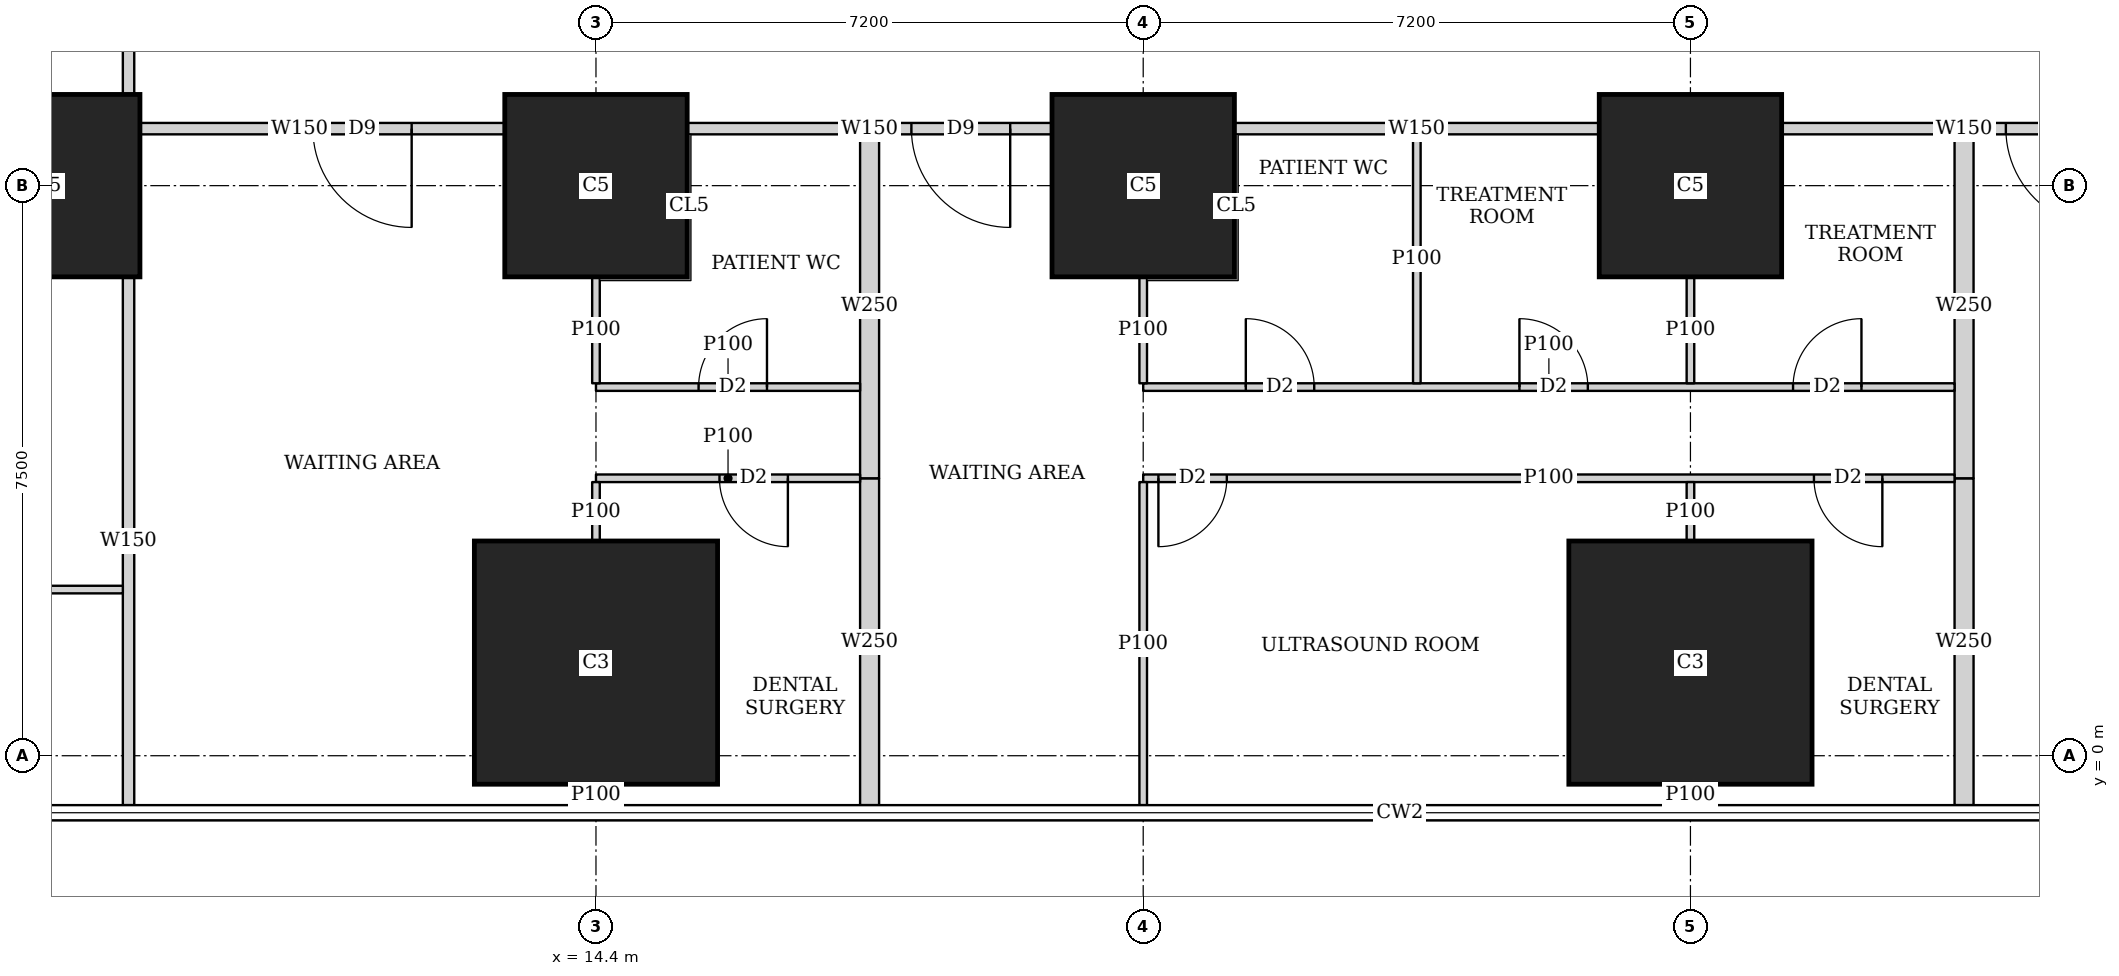
"""IFC4 building model, lengths in metres.
Left out: names, types, materials, properties, quantities, classifications, styles, units other than length and angle.
Written with IfcOpenShell. Run it as: python <this file> out.ifc"""

import sys

from ifc_helpers import new_model, si_unit, direction, frame, frame_2d, origin, origin_2d, place, context, subcontext, project, spatial, rectangle, extrude, element, fill, save


model = new_model("IFC4")
c1 = context("Model", 3, precision=1e-05, world=origin(), true_north=direction((0.0, 1.0)))
c2 = subcontext(c1, "Body", "Model", "MODEL_VIEW")
j1 = project(units=[si_unit("LENGTHUNIT", "METRE"), si_unit("PLANEANGLEUNIT", "RADIAN")], contexts=[c1])
p1 = place(None, origin())
s1 = spatial("IfcSite", under=j1, at=p1, CompositionType="ELEMENT")
p2 = place(p1, origin())
s2 = spatial("IfcBuilding", under=s1, at=p2, CompositionType="ELEMENT")
p3 = place(p2, frame((0.0, 0.0, 10.1)))
s3 = spatial("IfcBuildingStorey", under=s2, at=p3, CompositionType="ELEMENT", Elevation=10.1)
for number, where, z_axis, x_axis in (
    (1, (14.4, 1.225, 0.0), (0.0, 0.0, 1.0), (1.0, 0.0, 0.0)),
    (2, (28.8, 1.225, 0.0), (0.0, 0.0, 1.0), (1.0, 0.0, 0.0)),
):
    element("IfcColumn", number, at=place(p3, frame(where, z_axis=z_axis, x_axis=x_axis)), inside=s3, PredefinedType="COLUMN", context=c2, shape_type="SweptSolid", body=[
        extrude(rectangle(XDim=3.2, YDim=3.2, at=origin_2d()), origin(), (0.0, 0.0, 1.0), 4.5),
    ])
for number, where, z_axis, x_axis in (
    (3, (7.2, 7.5, 0.0), (0.0, 0.0, 1.0), (1.0, 0.0, 0.0)),
    (4, (14.4, 7.5, 0.0), (0.0, 0.0, 1.0), (1.0, 0.0, 0.0)),
    (5, (21.6, 7.5, 0.0), (0.0, 0.0, 1.0), (1.0, 0.0, 0.0)),
    (6, (28.8, 7.5, 0.0), (0.0, 0.0, 1.0), (1.0, 0.0, 0.0)),
):
    element("IfcColumn", number, at=place(p3, frame(where, z_axis=z_axis, x_axis=x_axis)), inside=s3, PredefinedType="COLUMN", context=c2, shape_type="SweptSolid", body=[
        extrude(rectangle(XDim=2.4, YDim=2.4, at=origin_2d()), origin(), (0.0, 0.0, 1.0), 4.5),
    ])
p4 = place(p3, frame((8.25, -0.65, 0.0), z_axis=(0.0, 0.0, 1.0), x_axis=(0.0, 1.0, 0.0)))
e7 = element("IfcWall", 7, at=p4, inside=s3, PredefinedType="SOLIDWALL", context=c2, shape_type="SweptSolid", body=[
    extrude(rectangle(XDim=6.949, YDim=0.15, at=frame_2d((3.475, 0.0))), origin(), (0.0, 0.0, 1.0), 2.4),
])
p5 = place(p3, frame((8.25, 8.701, 0.0), z_axis=(0.0, 0.0, 1.0), x_axis=(0.0, 1.0, 0.0)))
e8 = element("IfcWall", 8, at=p5, inside=s3, PredefinedType="SOLIDWALL", context=c2, shape_type="SweptSolid", body=[
    extrude(rectangle(XDim=5.098, YDim=0.15, at=frame_2d((2.549, 0.0))), origin(), (0.0, 0.0, 1.0), 4.2),
])
p6 = place(p5, frame((0.661, 0.0, 0.0)))
e9 = element("IfcOpeningElement", 9, at=p6, cuts=e8, PredefinedType="OPENING", context=c2, shape_type="SweptSolid", body=[
    extrude(rectangle(XDim=1.3, YDim=2.1, at=frame_2d((0.65, 1.05))), frame((0.0, 0.085, 0.0), z_axis=(0.0, -1.0, 0.0), x_axis=(1.0, 0.0, 0.0)), (0.0, 0.0, 1.0), 0.17),
])
p7 = place(p5, frame((3.136, 0.0, 0.0)))
e10 = element("IfcOpeningElement", 10, at=p7, cuts=e8, PredefinedType="OPENING", context=c2, shape_type="SweptSolid", body=[
    extrude(rectangle(XDim=1.3, YDim=2.1, at=frame_2d((0.65, 1.05))), frame((0.0, 0.085, 0.0), z_axis=(0.0, -1.0, 0.0), x_axis=(1.0, 0.0, 0.0)), (0.0, 0.0, 1.0), 0.17),
])
p8 = place(p3, frame((34.799, 8.25, 0.0), z_axis=(0.0, 0.0, 1.0), x_axis=(-1.0, 0.0, 0.0)))
e11 = element("IfcWall", 11, at=p8, inside=s3, PredefinedType="SOLIDWALL", context=c2, shape_type="SweptSolid", body=[
    extrude(rectangle(XDim=4.798, YDim=0.15, at=frame_2d((2.399, 0.0))), origin(), (0.0, 0.0, 1.0), 2.6),
])
p9 = place(p8, frame((0.549, 0.0, 0.0)))
e12 = element("IfcOpeningElement", 12, at=p9, cuts=e11, PredefinedType="OPENING", context=c2, shape_type="SweptSolid", body=[
    extrude(rectangle(XDim=1.3, YDim=2.1, at=frame_2d((0.65, 1.05))), frame((0.0, 0.085, 0.0), z_axis=(0.0, -1.0, 0.0), x_axis=(1.0, 0.0, 0.0)), (0.0, 0.0, 1.0), 0.17),
])
p10 = place(p3, frame((27.599, 8.25, 0.0), z_axis=(0.0, 0.0, 1.0), x_axis=(-1.0, 0.0, 0.0)))
e13 = element("IfcWall", 13, at=p10, inside=s3, PredefinedType="SOLIDWALL", context=c2, shape_type="SweptSolid", body=[
    extrude(rectangle(XDim=4.798, YDim=0.15, at=frame_2d((2.399, 0.0))), origin(), (0.0, 0.0, 1.0), 2.6),
])
p11 = place(p3, frame((20.399, 8.25, 0.0), z_axis=(0.0, 0.0, 1.0), x_axis=(-1.0, 0.0, 0.0)))
e14 = element("IfcWall", 14, at=p11, inside=s3, PredefinedType="SOLIDWALL", context=c2, shape_type="SweptSolid", body=[
    extrude(rectangle(XDim=4.798, YDim=0.15, at=frame_2d((2.399, 0.0))), origin(), (0.0, 0.0, 1.0), 2.6),
])
p12 = place(p11, frame((0.549, 0.0, 0.0)))
e15 = element("IfcOpeningElement", 15, at=p12, cuts=e14, PredefinedType="OPENING", context=c2, shape_type="SweptSolid", body=[
    extrude(rectangle(XDim=1.3, YDim=2.1, at=frame_2d((0.65, 1.05))), frame((0.0, 0.085, 0.0), z_axis=(0.0, -1.0, 0.0), x_axis=(1.0, 0.0, 0.0)), (0.0, 0.0, 1.0), 0.17),
])
p13 = place(p3, frame((13.199, 8.25, 0.0), z_axis=(0.0, 0.0, 1.0), x_axis=(-1.0, 0.0, 0.0)))
e16 = element("IfcWall", 16, at=p13, inside=s3, PredefinedType="SOLIDWALL", context=c2, shape_type="SweptSolid", body=[
    extrude(rectangle(XDim=4.798, YDim=0.15, at=frame_2d((2.399, 0.0))), origin(), (0.0, 0.0, 1.0), 2.6),
])
p14 = place(p13, frame((1.224, 0.0, 0.0)))
e17 = element("IfcOpeningElement", 17, at=p14, cuts=e16, PredefinedType="OPENING", context=c2, shape_type="SweptSolid", body=[
    extrude(rectangle(XDim=1.3, YDim=2.1, at=frame_2d((0.65, 1.05))), frame((0.0, 0.085, 0.0), z_axis=(0.0, -1.0, 0.0), x_axis=(1.0, 0.0, 0.0)), (0.0, 0.0, 1.0), 0.17),
])
p15 = place(p3, frame((4.9, 2.186, 0.0), z_axis=(0.0, 0.0, 1.0), x_axis=(1.0, 0.0, 0.0)))
e18 = element("IfcWall", 18, at=p15, inside=s3, PredefinedType="PARTITIONING", context=c2, shape_type="SweptSolid", body=[
    extrude(rectangle(XDim=3.275, YDim=0.1, at=frame_2d((1.638, 0.0))), origin(), (0.0, 0.0, 1.0), 2.4),
])
p16 = place(p3, frame((17.875, 3.65, 0.0), z_axis=(0.0, 0.0, 1.0), x_axis=(-1.0, 0.0, 0.0)))
e19 = element("IfcWall", 19, at=p16, inside=s3, PredefinedType="PARTITIONING", context=c2, shape_type="SweptSolid", body=[
    extrude(rectangle(XDim=3.475, YDim=0.1, at=frame_2d((1.738, 0.0))), origin(), (0.0, 0.0, 1.0), 2.6),
])
p17 = place(p16, frame((0.95, 0.0, 0.0)))
e20 = element("IfcOpeningElement", 20, at=p17, cuts=e19, PredefinedType="OPENING", context=c2, shape_type="SweptSolid", body=[
    extrude(rectangle(XDim=0.9, YDim=2.1, at=frame_2d((0.45, 1.05))), frame((0.0, 0.06, 0.0), z_axis=(0.0, -1.0, 0.0), x_axis=(1.0, 0.0, 0.0)), (0.0, 0.0, 1.0), 0.12),
])
p18 = place(p3, frame((17.875, 4.85, 0.0), z_axis=(0.0, 0.0, 1.0), x_axis=(-1.0, 0.0, 0.0)))
e21 = element("IfcWall", 21, at=p18, inside=s3, PredefinedType="PARTITIONING", context=c2, shape_type="SweptSolid", body=[
    extrude(rectangle(XDim=3.475, YDim=0.1, at=frame_2d((1.738, 0.0))), origin(), (0.0, 0.0, 1.0), 2.6),
])
p19 = place(p18, frame((1.225, 0.0, 0.0)))
e22 = element("IfcOpeningElement", 22, at=p19, cuts=e21, PredefinedType="OPENING", context=c2, shape_type="SweptSolid", body=[
    extrude(rectangle(XDim=0.9, YDim=2.1, at=frame_2d((0.45, 1.05))), frame((0.0, 0.06, 0.0), z_axis=(0.0, -1.0, 0.0), x_axis=(1.0, 0.0, 0.0)), (0.0, 0.0, 1.0), 0.12),
])
p20 = place(p3, frame((14.4, -0.65, 0.0), z_axis=(0.0, 0.0, 1.0), x_axis=(0.0, 1.0, 0.0)))
e23 = element("IfcWall", 23, at=p20, inside=s3, PredefinedType="PARTITIONING", context=c2, shape_type="SweptSolid", body=[
    extrude(rectangle(XDim=0.274, YDim=0.1, at=frame_2d((0.137, 0.0))), origin(), (0.0, 0.0, 1.0), 4.2),
])
p21 = place(p3, frame((14.4, 2.826, 0.0), z_axis=(0.0, 0.0, 1.0), x_axis=(0.0, 1.0, 0.0)))
e24 = element("IfcWall", 24, at=p21, inside=s3, PredefinedType="PARTITIONING", context=c2, shape_type="SweptSolid", body=[
    extrude(rectangle(XDim=0.774, YDim=0.1, at=frame_2d((0.387, 0.0))), origin(), (0.0, 0.0, 1.0), 2.6),
])
p22 = place(p3, frame((14.4, 4.9, 0.0), z_axis=(0.0, 0.0, 1.0), x_axis=(0.0, 1.0, 0.0)))
e25 = element("IfcWall", 25, at=p22, inside=s3, PredefinedType="PARTITIONING", context=c2, shape_type="SweptSolid", body=[
    extrude(rectangle(XDim=1.399, YDim=0.1, at=frame_2d((0.7, 0.0))), origin(), (0.0, 0.0, 1.0), 2.6),
])
p23 = place(p3, frame((32.275, 3.65, 0.0), z_axis=(0.0, 0.0, 1.0), x_axis=(-1.0, 0.0, 0.0)))
e26 = element("IfcWall", 26, at=p23, inside=s3, PredefinedType="PARTITIONING", context=c2, shape_type="SweptSolid", body=[
    extrude(rectangle(XDim=10.675, YDim=0.1, at=frame_2d((5.337, 0.0))), origin(), (0.0, 0.0, 1.0), 2.6),
])
p24 = place(p23, frame((9.575, 0.0, 0.0)))
e27 = element("IfcOpeningElement", 27, at=p24, cuts=e26, PredefinedType="OPENING", context=c2, shape_type="SweptSolid", body=[
    extrude(rectangle(XDim=0.9, YDim=2.1, at=frame_2d((0.45, 1.05))), frame((0.0, 0.06, 0.0), z_axis=(0.0, -1.0, 0.0), x_axis=(1.0, 0.0, 0.0)), (0.0, 0.0, 1.0), 0.12),
])
p25 = place(p23, frame((0.95, 0.0, 0.0)))
e28 = element("IfcOpeningElement", 28, at=p25, cuts=e26, PredefinedType="OPENING", context=c2, shape_type="SweptSolid", body=[
    extrude(rectangle(XDim=0.9, YDim=2.1, at=frame_2d((0.45, 1.05))), frame((0.0, 0.06, 0.0), z_axis=(0.0, -1.0, 0.0), x_axis=(1.0, 0.0, 0.0)), (0.0, 0.0, 1.0), 0.12),
])
p26 = place(p3, frame((32.275, 4.85, 0.0), z_axis=(0.0, 0.0, 1.0), x_axis=(-1.0, 0.0, 0.0)))
e29 = element("IfcWall", 29, at=p26, inside=s3, PredefinedType="PARTITIONING", context=c2, shape_type="SweptSolid", body=[
    extrude(rectangle(XDim=10.675, YDim=0.1, at=frame_2d((5.337, 0.0))), origin(), (0.0, 0.0, 1.0), 2.6),
])
p27 = place(p26, frame((8.425, 0.0, 0.0)))
e30 = element("IfcOpeningElement", 30, at=p27, cuts=e29, PredefinedType="OPENING", context=c2, shape_type="SweptSolid", body=[
    extrude(rectangle(XDim=0.9, YDim=2.1, at=frame_2d((0.45, 1.05))), frame((0.0, 0.06, 0.0), z_axis=(0.0, -1.0, 0.0), x_axis=(1.0, 0.0, 0.0)), (0.0, 0.0, 1.0), 0.12),
])
p28 = place(p26, frame((4.825, 0.0, 0.0)))
e31 = element("IfcOpeningElement", 31, at=p28, cuts=e29, PredefinedType="OPENING", context=c2, shape_type="SweptSolid", body=[
    extrude(rectangle(XDim=0.9, YDim=2.1, at=frame_2d((0.45, 1.05))), frame((0.0, 0.06, 0.0), z_axis=(0.0, -1.0, 0.0), x_axis=(1.0, 0.0, 0.0)), (0.0, 0.0, 1.0), 0.12),
])
p29 = place(p26, frame((1.225, 0.0, 0.0)))
e32 = element("IfcOpeningElement", 32, at=p29, cuts=e29, PredefinedType="OPENING", context=c2, shape_type="SweptSolid", body=[
    extrude(rectangle(XDim=0.9, YDim=2.1, at=frame_2d((0.45, 1.05))), frame((0.0, 0.06, 0.0), z_axis=(0.0, -1.0, 0.0), x_axis=(1.0, 0.0, 0.0)), (0.0, 0.0, 1.0), 0.12),
])
p30 = place(p3, frame((21.6, -0.65, 0.0), z_axis=(0.0, 0.0, 1.0), x_axis=(0.0, 1.0, 0.0)))
e33 = element("IfcWall", 33, at=p30, inside=s3, PredefinedType="PARTITIONING", context=c2, shape_type="SweptSolid", body=[
    extrude(rectangle(XDim=4.25, YDim=0.1, at=frame_2d((2.125, 0.0))), origin(), (0.0, 0.0, 1.0), 2.4),
])
p31 = place(p3, frame((28.8, -0.65, 0.0), z_axis=(0.0, 0.0, 1.0), x_axis=(0.0, 1.0, 0.0)))
e34 = element("IfcWall", 34, at=p31, inside=s3, PredefinedType="PARTITIONING", context=c2, shape_type="SweptSolid", body=[
    extrude(rectangle(XDim=0.274, YDim=0.1, at=frame_2d((0.137, 0.0))), origin(), (0.0, 0.0, 1.0), 4.2),
])
p32 = place(p3, frame((28.8, 2.826, 0.0), z_axis=(0.0, 0.0, 1.0), x_axis=(0.0, 1.0, 0.0)))
e35 = element("IfcWall", 35, at=p32, inside=s3, PredefinedType="PARTITIONING", context=c2, shape_type="SweptSolid", body=[
    extrude(rectangle(XDim=0.774, YDim=0.1, at=frame_2d((0.387, 0.0))), origin(), (0.0, 0.0, 1.0), 2.6),
])
p33 = place(p3, frame((21.6, 4.9, 0.0), z_axis=(0.0, 0.0, 1.0), x_axis=(0.0, 1.0, 0.0)))
e36 = element("IfcWall", 36, at=p33, inside=s3, PredefinedType="PARTITIONING", context=c2, shape_type="SweptSolid", body=[
    extrude(rectangle(XDim=1.399, YDim=0.1, at=frame_2d((0.7, 0.0))), origin(), (0.0, 0.0, 1.0), 4.2),
])
p34 = place(p3, frame((25.2, 4.9, 0.0), z_axis=(0.0, 0.0, 1.0), x_axis=(0.0, 1.0, 0.0)))
e37 = element("IfcWall", 37, at=p34, inside=s3, PredefinedType="PARTITIONING", context=c2, shape_type="SweptSolid", body=[
    extrude(rectangle(XDim=3.275, YDim=0.1, at=frame_2d((1.638, 0.0))), origin(), (0.0, 0.0, 1.0), 2.6),
])
p35 = place(p3, frame((28.8, 4.9, 0.0), z_axis=(0.0, 0.0, 1.0), x_axis=(0.0, 1.0, 0.0)))
e38 = element("IfcWall", 38, at=p35, inside=s3, PredefinedType="PARTITIONING", context=c2, shape_type="SweptSolid", body=[
    extrude(rectangle(XDim=1.399, YDim=0.1, at=frame_2d((0.7, 0.0))), origin(), (0.0, 0.0, 1.0), 2.6),
])
p36 = place(p3, frame((18.0, -0.65, 0.0), z_axis=(0.0, 0.0, 1.0), x_axis=(0.0, 1.0, 0.0)))
e39 = element("IfcWall", 39, at=p36, inside=s3, PredefinedType="SOLIDWALL", context=c2, shape_type="SweptSolid", body=[
    extrude(rectangle(XDim=4.3, YDim=0.25, at=frame_2d((2.15, 0.0))), origin(), (0.0, 0.0, 1.0), 2.4),
])
p37 = place(p3, frame((18.0, 3.65, 0.0), z_axis=(0.0, 0.0, 1.0), x_axis=(0.0, 1.0, 0.0)))
e40 = element("IfcWall", 40, at=p37, inside=s3, PredefinedType="SOLIDWALL", context=c2, shape_type="SweptSolid", body=[
    extrude(rectangle(XDim=4.525, YDim=0.25, at=frame_2d((2.263, 0.0))), origin(), (0.0, 0.0, 1.0), 2.6),
])
p38 = place(p3, frame((32.4, -0.65, 0.0), z_axis=(0.0, 0.0, 1.0), x_axis=(0.0, 1.0, 0.0)))
e41 = element("IfcWall", 41, at=p38, inside=s3, PredefinedType="SOLIDWALL", context=c2, shape_type="SweptSolid", body=[
    extrude(rectangle(XDim=4.3, YDim=0.25, at=frame_2d((2.15, 0.0))), origin(), (0.0, 0.0, 1.0), 2.4),
])
p39 = place(p3, frame((32.4, 3.65, 0.0), z_axis=(0.0, 0.0, 1.0), x_axis=(0.0, 1.0, 0.0)))
e42 = element("IfcWall", 42, at=p39, inside=s3, PredefinedType="SOLIDWALL", context=c2, shape_type="SweptSolid", body=[
    extrude(rectangle(XDim=4.525, YDim=0.25, at=frame_2d((2.263, 0.0))), origin(), (0.0, 0.0, 1.0), 2.6),
])
p40 = place(p17, origin())
e43 = element("IfcDoor", 43, at=p40, inside=s3, OperationType="SINGLE_SWING_LEFT", PredefinedType="DOOR", context=c2, shape_type="SweptSolid", body=[
    extrude(rectangle(XDim=0.9, YDim=2.1, at=frame_2d((0.45, 1.05))), frame((0.0, 0.025, 0.0), z_axis=(0.0, -1.0, 0.0), x_axis=(1.0, 0.0, 0.0)), (0.0, 0.0, 1.0), 0.05),
])
fill(e20, e43)
p41 = place(p19, origin())
e44 = element("IfcDoor", 44, at=p41, inside=s3, OperationType="SINGLE_SWING_RIGHT", PredefinedType="DOOR", context=c2, shape_type="SweptSolid", body=[
    extrude(rectangle(XDim=0.9, YDim=2.1, at=frame_2d((0.45, 1.05))), frame((0.0, 0.025, 0.0), z_axis=(0.0, -1.0, 0.0), x_axis=(1.0, 0.0, 0.0)), (0.0, 0.0, 1.0), 0.05),
])
fill(e22, e44)
p42 = place(p14, origin())
e45 = element("IfcDoor", 45, at=p42, inside=s3, OperationType="DOUBLE_DOOR_SINGLE_SWING", PredefinedType="DOOR", context=c2, shape_type="SweptSolid", body=[
    extrude(rectangle(XDim=1.3, YDim=2.1, at=frame_2d((0.65, 1.05))), frame((0.0, 0.025, 0.0), z_axis=(0.0, -1.0, 0.0), x_axis=(1.0, 0.0, 0.0)), (0.0, 0.0, 1.0), 0.05),
])
fill(e17, e45)
p43 = place(p24, origin())
e46 = element("IfcDoor", 46, at=p43, inside=s3, OperationType="SINGLE_SWING_RIGHT", PredefinedType="DOOR", context=c2, shape_type="SweptSolid", body=[
    extrude(rectangle(XDim=0.9, YDim=2.1, at=frame_2d((0.45, 1.05))), frame((0.0, 0.025, 0.0), z_axis=(0.0, -1.0, 0.0), x_axis=(1.0, 0.0, 0.0)), (0.0, 0.0, 1.0), 0.05),
])
fill(e27, e46)
p44 = place(p25, origin())
e47 = element("IfcDoor", 47, at=p44, inside=s3, OperationType="SINGLE_SWING_LEFT", PredefinedType="DOOR", context=c2, shape_type="SweptSolid", body=[
    extrude(rectangle(XDim=0.9, YDim=2.1, at=frame_2d((0.45, 1.05))), frame((0.0, 0.025, 0.0), z_axis=(0.0, -1.0, 0.0), x_axis=(1.0, 0.0, 0.0)), (0.0, 0.0, 1.0), 0.05),
])
fill(e28, e47)
p45 = place(p27, origin())
e48 = element("IfcDoor", 48, at=p45, inside=s3, OperationType="SINGLE_SWING_LEFT", PredefinedType="DOOR", context=c2, shape_type="SweptSolid", body=[
    extrude(rectangle(XDim=0.9, YDim=2.1, at=frame_2d((0.45, 1.05))), frame((0.0, 0.025, 0.0), z_axis=(0.0, -1.0, 0.0), x_axis=(1.0, 0.0, 0.0)), (0.0, 0.0, 1.0), 0.05),
])
fill(e30, e48)
p46 = place(p28, origin())
e49 = element("IfcDoor", 49, at=p46, inside=s3, OperationType="SINGLE_SWING_LEFT", PredefinedType="DOOR", context=c2, shape_type="SweptSolid", body=[
    extrude(rectangle(XDim=0.9, YDim=2.1, at=frame_2d((0.45, 1.05))), frame((0.0, 0.025, 0.0), z_axis=(0.0, -1.0, 0.0), x_axis=(1.0, 0.0, 0.0)), (0.0, 0.0, 1.0), 0.05),
])
fill(e31, e49)
p47 = place(p29, origin())
e50 = element("IfcDoor", 50, at=p47, inside=s3, OperationType="SINGLE_SWING_RIGHT", PredefinedType="DOOR", context=c2, shape_type="SweptSolid", body=[
    extrude(rectangle(XDim=0.9, YDim=2.1, at=frame_2d((0.45, 1.05))), frame((0.0, 0.025, 0.0), z_axis=(0.0, -1.0, 0.0), x_axis=(1.0, 0.0, 0.0)), (0.0, 0.0, 1.0), 0.05),
])
fill(e32, e50)
p48 = place(p12, origin())
e51 = element("IfcDoor", 51, at=p48, inside=s3, OperationType="DOUBLE_DOOR_SINGLE_SWING", PredefinedType="DOOR", context=c2, shape_type="SweptSolid", body=[
    extrude(rectangle(XDim=1.3, YDim=2.1, at=frame_2d((0.65, 1.05))), frame((0.0, 0.025, 0.0), z_axis=(0.0, -1.0, 0.0), x_axis=(1.0, 0.0, 0.0)), (0.0, 0.0, 1.0), 0.05),
])
fill(e15, e51)
p49 = place(p9, origin())
e52 = element("IfcDoor", 52, at=p49, inside=s3, OperationType="DOUBLE_DOOR_SINGLE_SWING", PredefinedType="DOOR", context=c2, shape_type="SweptSolid", body=[
    extrude(rectangle(XDim=1.3, YDim=2.1, at=frame_2d((0.65, 1.05))), frame((0.0, 0.025, 0.0), z_axis=(0.0, -1.0, 0.0), x_axis=(1.0, 0.0, 0.0)), (0.0, 0.0, 1.0), 0.05),
])
fill(e12, e52)
save(model, sys.argv[1])
